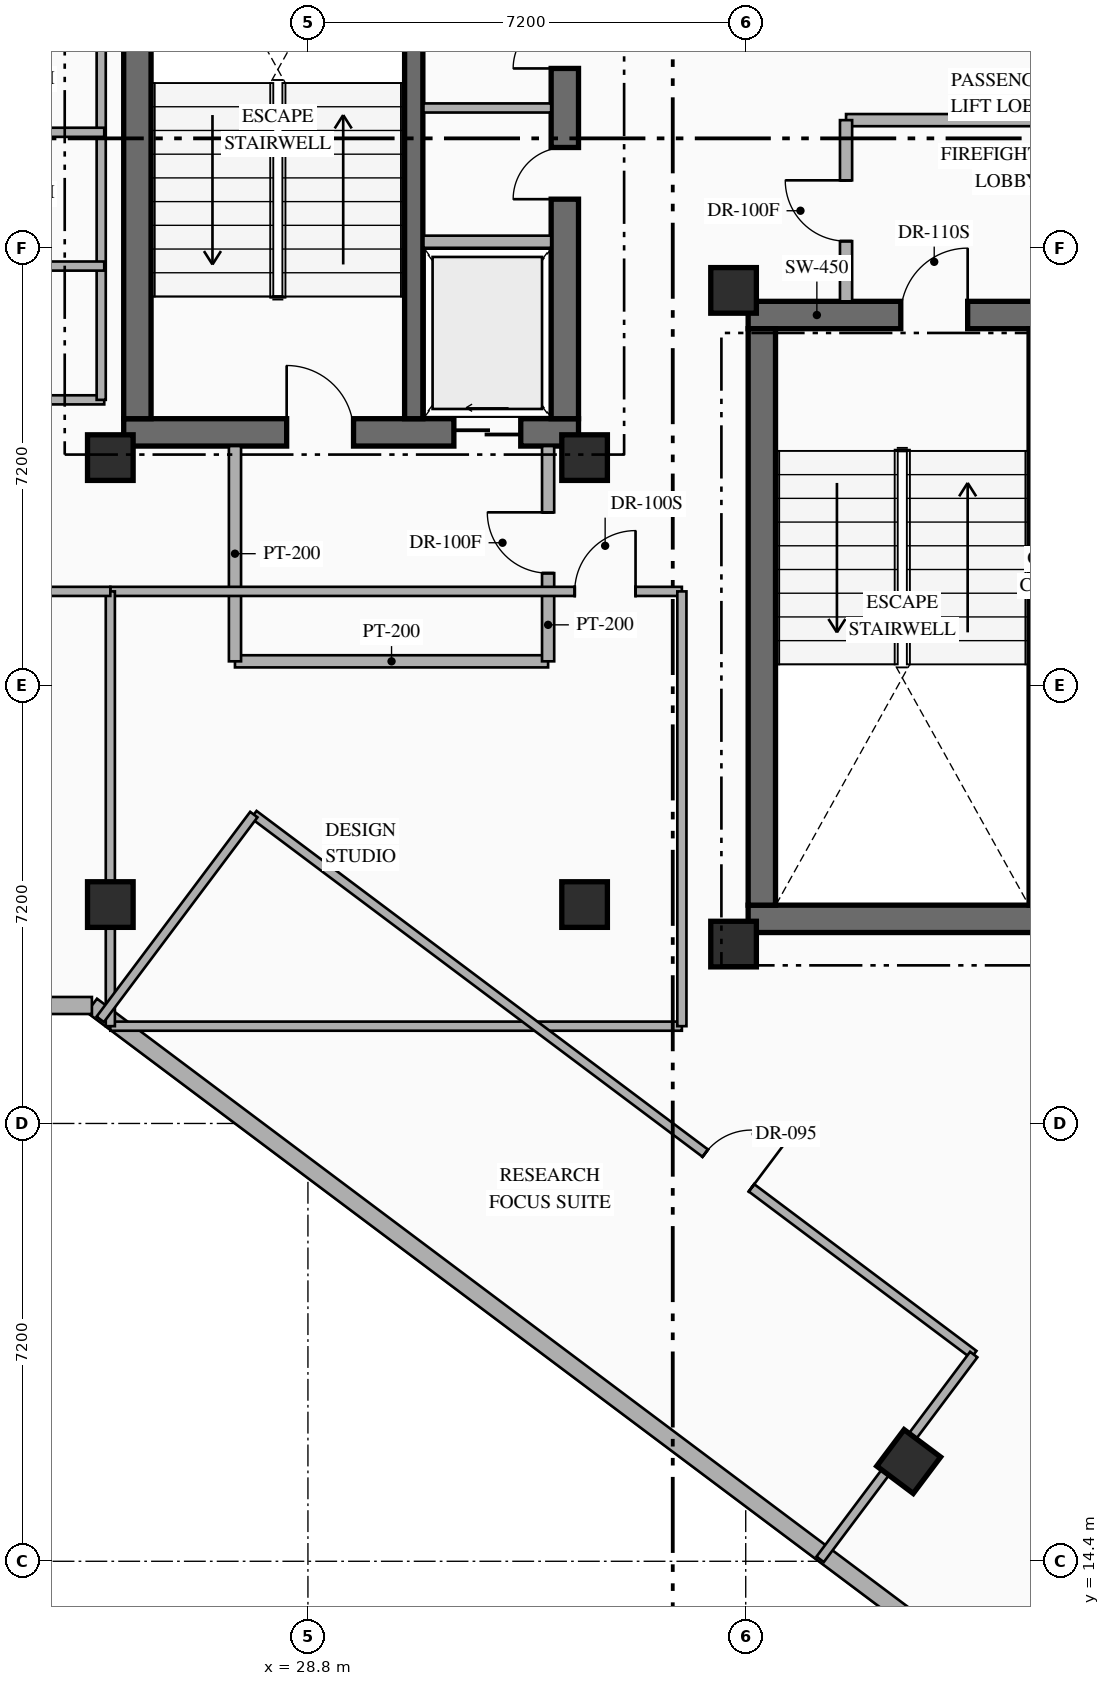
"""IFC4 building model, lengths in metres.
Left out: names, types, materials, properties, quantities, classifications, styles, units other than length and angle.
Written with IfcOpenShell. Run it as: python <this file> out.ifc"""

import sys

from ifc_helpers import new_model, si_unit, direction, frame, frame_2d, origin, origin_2d, place, context, subcontext, project, spatial, rectangle, hollow_rectangle, extrude, element, fill, save


model = new_model("IFC4")
c1 = context("Model", 3, precision=1e-05, world=origin(), true_north=direction((0.0, 1.0)))
c2 = subcontext(c1, "Body", "Model", "MODEL_VIEW")
j1 = project(units=[si_unit("LENGTHUNIT", "METRE"), si_unit("PLANEANGLEUNIT", "RADIAN")], contexts=[c1])
p1 = place(None, origin())
s1 = spatial("IfcSite", under=j1, at=p1, CompositionType="ELEMENT")
p2 = place(p1, origin())
s2 = spatial("IfcBuilding", under=s1, at=p2, CompositionType="ELEMENT")
p3 = place(p2, frame((0.0, 0.0, 205.95)))
s3 = spatial("IfcBuildingStorey", under=s2, at=p3, CompositionType="ELEMENT", Elevation=205.95)
p4 = place(p3, frame((25.77, 32.965, 0.0), z_axis=(0.0, 0.0, 1.0), x_axis=(1.0, 0.0, 0.0)))
e1 = element("IfcWall", 1, at=p4, inside=s3, PredefinedType="SHEAR", context=c2, shape_type="SweptSolid", body=[
    extrude(rectangle(XDim=7.48, YDim=0.45, at=frame_2d((3.74, 0.0))), origin(), (0.0, 0.0, 1.0), 3.6),
])
p5 = place(p4, frame((2.68, 0.0, 0.0)))
e2 = element("IfcOpeningElement", 2, at=p5, cuts=e1, PredefinedType="OPENING", context=c2, shape_type="SweptSolid", body=[
    extrude(rectangle(XDim=1.1, YDim=2.2, at=frame_2d((0.55, 1.1))), frame((0.0, 0.235, 0.0), z_axis=(0.0, -1.0, 0.0), x_axis=(1.0, 0.0, 0.0)), (0.0, 0.0, 1.0), 0.47),
])
p6 = place(p4, frame((5.43, 0.0, 0.0)))
e3 = element("IfcOpeningElement", 3, at=p6, cuts=e1, PredefinedType="OPENING", context=c2, shape_type="SweptSolid", body=[
    extrude(rectangle(XDim=1.1, YDim=2.15, at=frame_2d((0.55, 1.075))), frame((0.0, 0.235, 0.0), z_axis=(0.0, -1.0, 0.0), x_axis=(1.0, 0.0, 0.0)), (0.0, 0.0, 1.0), 0.47),
])
p7 = place(p3, frame((25.995, 33.19, 0.0), z_axis=(0.0, 0.0, 1.0), x_axis=(0.0, 1.0, 0.0)))
e4 = element("IfcWall", 4, at=p7, inside=s3, PredefinedType="SHEAR", context=c2, shape_type="SweptSolid", body=[
    extrude(rectangle(XDim=9.48, YDim=0.45, at=frame_2d((4.74, 0.0))), origin(), (0.0, 0.0, 1.0), 3.6),
])
p8 = place(p3, frame((33.025, 33.19, 0.0), z_axis=(0.0, 0.0, 1.0), x_axis=(0.0, 1.0, 0.0)))
e5 = element("IfcWall", 5, at=p8, inside=s3, PredefinedType="SHEAR", context=c2, shape_type="SweptSolid", body=[
    extrude(rectangle(XDim=9.48, YDim=0.45, at=frame_2d((4.74, 0.0))), origin(), (0.0, 0.0, 1.0), 3.6),
])
p9 = place(p8, frame((3.61, 0.0, 0.0)))
e6 = element("IfcOpeningElement", 6, at=p9, cuts=e5, PredefinedType="OPENING", context=c2, shape_type="SweptSolid", body=[
    extrude(rectangle(XDim=0.85, YDim=2.08, at=frame_2d((0.425, 1.04))), frame((0.0, 0.235, 0.0), z_axis=(0.0, -1.0, 0.0), x_axis=(1.0, 0.0, 0.0)), (0.0, 0.0, 1.0), 0.47),
])
p10 = place(p8, frame((5.76, 0.0, 0.0)))
e7 = element("IfcOpeningElement", 7, at=p10, cuts=e5, PredefinedType="OPENING", context=c2, shape_type="SweptSolid", body=[
    extrude(rectangle(XDim=0.85, YDim=2.08, at=frame_2d((0.425, 1.04))), frame((0.0, 0.235, 0.0), z_axis=(0.0, -1.0, 0.0), x_axis=(1.0, 0.0, 0.0)), (0.0, 0.0, 1.0), 0.47),
])
p11 = place(p8, frame((7.76, 0.0, 0.0)))
e8 = element("IfcOpeningElement", 8, at=p11, cuts=e5, PredefinedType="OPENING", context=c2, shape_type="SweptSolid", body=[
    extrude(rectangle(XDim=0.85, YDim=2.08, at=frame_2d((0.425, 1.04))), frame((0.0, 0.235, 0.0), z_axis=(0.0, -1.0, 0.0), x_axis=(1.0, 0.0, 0.0)), (0.0, 0.0, 1.0), 0.47),
])
p12 = place(p3, frame((30.54, 33.19, 0.0), z_axis=(0.0, 0.0, 1.0), x_axis=(0.0, 1.0, 0.0)))
e9 = element("IfcWall", 9, at=p12, inside=s3, PredefinedType="SHEAR", context=c2, shape_type="SweptSolid", body=[
    extrude(rectangle(XDim=9.48, YDim=0.3, at=frame_2d((4.74, 0.0))), origin(), (0.0, 0.0, 1.0), 3.6),
])
p13 = place(p3, frame((36.04, 24.965, 0.0), z_axis=(0.0, 0.0, 1.0), x_axis=(1.0, 0.0, 0.0)))
e10 = element("IfcWall", 10, at=p13, inside=s3, PredefinedType="SHEAR", context=c2, shape_type="SweptSolid", body=[
    extrude(rectangle(XDim=7.46, YDim=0.45, at=frame_2d((3.73, 0.0))), origin(), (0.0, 0.0, 1.0), 3.6),
])
p14 = place(p3, frame((36.04, 34.895, 0.0), z_axis=(0.0, 0.0, 1.0), x_axis=(1.0, 0.0, 0.0)))
e11 = element("IfcWall", 11, at=p14, inside=s3, PredefinedType="SHEAR", context=c2, shape_type="SweptSolid", body=[
    extrude(rectangle(XDim=7.46, YDim=0.45, at=frame_2d((3.73, 0.0))), origin(), (0.0, 0.0, 1.0), 3.6),
])
p15 = place(p14, frame((2.51, 0.0, 0.0)))
e12 = element("IfcOpeningElement", 12, at=p15, cuts=e11, PredefinedType="OPENING", context=c2, shape_type="SweptSolid", body=[
    extrude(rectangle(XDim=1.1, YDim=2.2, at=frame_2d((0.55, 1.1))), frame((0.0, 0.235, 0.0), z_axis=(0.0, -1.0, 0.0), x_axis=(1.0, 0.0, 0.0)), (0.0, 0.0, 1.0), 0.47),
])
p16 = place(p14, frame((5.41, 0.0, 0.0)))
e13 = element("IfcOpeningElement", 13, at=p16, cuts=e11, PredefinedType="OPENING", context=c2, shape_type="SweptSolid", body=[
    extrude(rectangle(XDim=1.12, YDim=2.15, at=frame_2d((0.56, 1.075))), frame((0.0, 0.235, 0.0), z_axis=(0.0, -1.0, 0.0), x_axis=(1.0, 0.0, 0.0)), (0.0, 0.0, 1.0), 0.47),
])
p17 = place(p3, frame((36.265, 25.19, 0.0), z_axis=(0.0, 0.0, 1.0), x_axis=(0.0, 1.0, 0.0)))
e14 = element("IfcWall", 14, at=p17, inside=s3, PredefinedType="SHEAR", context=c2, shape_type="SweptSolid", body=[
    extrude(rectangle(XDim=9.48, YDim=0.45, at=frame_2d((4.74, 0.0))), origin(), (0.0, 0.0, 1.0), 3.6),
])
p18 = place(p3, frame((40.81, 25.19, 0.0), z_axis=(0.0, 0.0, 1.0), x_axis=(0.0, 1.0, 0.0)))
e15 = element("IfcWall", 15, at=p18, inside=s3, PredefinedType="SHEAR", context=c2, shape_type="SweptSolid", body=[
    extrude(rectangle(XDim=9.48, YDim=0.3, at=frame_2d((4.74, 0.0))), origin(), (0.0, 0.0, 1.0), 3.6),
])
for number, where, z_axis, x_axis in (
    (16, (25.55, 32.55, 0.0), (0.0, 0.0, 1.0), (1.0, 0.0, 0.0)),
    (17, (33.35, 32.55, 0.0), (0.0, 0.0, 1.0), (1.0, 0.0, 0.0)),
    (18, (35.8, 24.55, 0.0), (0.0, 0.0, 1.0), (1.0, 0.0, 0.0)),
    (19, (35.8, 35.3, 0.0), (0.0, 0.0, 1.0), (1.0, 0.0, 0.0)),
    (20, (25.55, 25.2, 0.0), (0.0, 0.0, 1.0), (1.0, 0.0, 0.0)),
    (21, (33.35, 25.2, 0.0), (0.0, 0.0, 1.0), (1.0, 0.0, 0.0)),
    (22, (38.68, 16.04, 0.0), (0.0, 0.0, 1.0), (0.8, -0.6, 0.0)),
):
    element("IfcColumn", number, at=place(p3, frame(where, z_axis=z_axis, x_axis=x_axis)), inside=s3, PredefinedType="COLUMN", context=c2, shape_type="SweptSolid", body=[
        extrude(hollow_rectangle(XDim=0.75, YDim=0.75, WallThickness=0.028, at=origin_2d()), origin(), (0.0, 0.0, 1.0), 3.6),
    ])
p19 = place(p3, frame((44.918, 8.787, 0.0), z_axis=(0.0, 0.0, 1.0), x_axis=(-0.800004765927, 0.599993645378, 0.0)))
e23 = element("IfcWall", 23, at=p19, inside=s3, PredefinedType="STANDARD", context=c2, shape_type="SweptSolid", body=[
    extrude(rectangle(XDim=24.588, YDim=0.28, at=frame_2d((12.294, 0.0))), origin(), (0.0, 0.0, 1.0), 3.35),
])
p20 = place(p3, frame((25.247, 23.54, 0.0), z_axis=(0.0, 0.0, 1.0), x_axis=(-1.0, 0.0, 0.0)))
e24 = element("IfcWall", 24, at=p20, inside=s3, PredefinedType="STANDARD", context=c2, shape_type="SweptSolid", body=[
    extrude(rectangle(XDim=4.789, YDim=0.28, at=frame_2d((2.395, 0.0))), origin(), (0.0, 0.0, 1.0), 3.35),
])
p21 = place(p3, frame((30.7, 36.1, 0.0), z_axis=(0.0, 0.0, 1.0), x_axis=(1.0, 0.0, 0.0)))
e25 = element("IfcWall", 25, at=p21, inside=s3, PredefinedType="STANDARD", context=c2, shape_type="SweptSolid", body=[
    extrude(rectangle(XDim=2.1, YDim=0.2, at=frame_2d((1.05, 0.0))), origin(), (0.0, 0.0, 1.0), 3.35),
])
p22 = place(p3, frame((30.7, 38.3, 0.0), z_axis=(0.0, 0.0, 1.0), x_axis=(1.0, 0.0, 0.0)))
e26 = element("IfcWall", 26, at=p22, inside=s3, PredefinedType="PARTITIONING", context=c2, shape_type="SweptSolid", body=[
    extrude(rectangle(XDim=2.1, YDim=0.15, at=frame_2d((1.05, 0.0))), origin(), (0.0, 0.0, 1.0), 3.35),
])
p23 = place(p3, frame((27.6, 29.2, 0.0), z_axis=(0.0, 0.0, 1.0), x_axis=(1.0, 0.0, 0.0)))
e27 = element("IfcWall", 27, at=p23, inside=s3, PredefinedType="STANDARD", context=c2, shape_type="SweptSolid", body=[
    extrude(rectangle(XDim=5.15, YDim=0.2, at=frame_2d((2.575, 0.0))), origin(), (0.0, 0.0, 1.0), 3.35),
])
p24 = place(p3, frame((27.6, 29.2, 0.0), z_axis=(0.0, 0.0, 1.0), x_axis=(0.0, 1.0, 0.0)))
e28 = element("IfcWall", 28, at=p24, inside=s3, PredefinedType="STANDARD", context=c2, shape_type="SweptSolid", body=[
    extrude(rectangle(XDim=3.54, YDim=0.2, at=frame_2d((1.77, 0.0))), origin(), (0.0, 0.0, 1.0), 3.35),
])
p25 = place(p3, frame((32.75, 29.2, 0.0), z_axis=(0.0, 0.0, 1.0), x_axis=(0.0, 1.0, 0.0)))
e29 = element("IfcWall", 29, at=p25, inside=s3, PredefinedType="STANDARD", context=c2, shape_type="SweptSolid", body=[
    extrude(rectangle(XDim=3.54, YDim=0.2, at=frame_2d((1.77, 0.0))), origin(), (0.0, 0.0, 1.0), 3.35),
])
p26 = place(p25, frame((1.45, 0.0, 0.0)))
e30 = element("IfcOpeningElement", 30, at=p26, cuts=e29, PredefinedType="OPENING", context=c2, shape_type="SweptSolid", body=[
    extrude(rectangle(XDim=1.0, YDim=2.2, at=frame_2d((0.5, 1.1))), frame((0.0, 0.11, 0.0), z_axis=(0.0, -1.0, 0.0), x_axis=(1.0, 0.0, 0.0)), (0.0, 0.0, 1.0), 0.22),
])
p27 = place(p3, frame((37.65, 38.1, 0.0), z_axis=(0.0, 0.0, 1.0), x_axis=(1.0, 0.0, 0.0)))
e31 = element("IfcWall", 31, at=p27, inside=s3, PredefinedType="STANDARD", context=c2, shape_type="SweptSolid", body=[
    extrude(rectangle(XDim=5.3, YDim=0.2, at=frame_2d((2.65, 0.0))), origin(), (0.0, 0.0, 1.0), 3.35),
])
p28 = place(p3, frame((37.65, 35.12, 0.0), z_axis=(0.0, 0.0, 1.0), x_axis=(0.0, 1.0, 0.0)))
e32 = element("IfcWall", 32, at=p28, inside=s3, PredefinedType="STANDARD", context=c2, shape_type="SweptSolid", body=[
    extrude(rectangle(XDim=2.98, YDim=0.2, at=frame_2d((1.49, 0.0))), origin(), (0.0, 0.0, 1.0), 3.35),
])
p29 = place(p28, frame((0.99, 0.0, 0.0)))
e33 = element("IfcOpeningElement", 33, at=p29, cuts=e32, PredefinedType="OPENING", context=c2, shape_type="SweptSolid", body=[
    extrude(rectangle(XDim=1.0, YDim=2.2, at=frame_2d((0.5, 1.1))), frame((0.0, 0.11, 0.0), z_axis=(0.0, -1.0, 0.0), x_axis=(1.0, 0.0, 0.0)), (0.0, 0.0, 1.0), 0.22),
])
p30 = place(p3, frame((22.15, 33.5, 0.0), z_axis=(0.0, 0.0, 1.0), x_axis=(1.0, 0.0, 0.0)))
e34 = element("IfcWall", 34, at=p30, inside=s3, PredefinedType="PARTITIONING", context=c2, shape_type="SweptSolid", body=[
    extrude(rectangle(XDim=3.3, YDim=0.15, at=frame_2d((1.65, 0.0))), origin(), (0.0, 0.0, 1.0), 3.35),
])
p31 = place(p3, frame((25.4, 33.5, 0.0), z_axis=(0.0, 0.0, 1.0), x_axis=(0.0, 1.0, 0.0)))
e35 = element("IfcWall", 35, at=p31, inside=s3, PredefinedType="PARTITIONING", context=c2, shape_type="SweptSolid", body=[
    extrude(rectangle(XDim=6.6, YDim=0.15, at=frame_2d((3.3, 0.0))), origin(), (0.0, 0.0, 1.0), 3.35),
])
for number, where, z_axis, x_axis in (
    (36, (22.15, 35.7, 0.0), (0.0, 0.0, 1.0), (1.0, 0.0, 0.0)),
    (37, (22.15, 37.9, 0.0), (0.0, 0.0, 1.0), (1.0, 0.0, 0.0)),
):
    element("IfcWall", number, at=place(p3, frame(where, z_axis=z_axis, x_axis=x_axis)), inside=s3, PredefinedType="PARTITIONING", context=c2, shape_type="SweptSolid", body=[
        extrude(rectangle(XDim=3.3, YDim=0.15, at=frame_2d((1.65, 0.0))), origin(), (0.0, 0.0, 1.0), 3.35),
    ])
p32 = place(p3, frame((25.55, 23.2, 0.0), z_axis=(0.0, 0.0, 1.0), x_axis=(1.0, 0.0, 0.0)))
e38 = element("IfcWall", 38, at=p32, inside=s3, PredefinedType="PARTITIONING", context=c2, shape_type="SweptSolid", body=[
    extrude(rectangle(XDim=9.4, YDim=0.15, at=frame_2d((4.7, 0.0))), origin(), (0.0, 0.0, 1.0), 3.35),
])
p33 = place(p3, frame((25.55, 30.35, 0.0), z_axis=(0.0, 0.0, 1.0), x_axis=(1.0, 0.0, 0.0)))
e39 = element("IfcWall", 39, at=p33, inside=s3, PredefinedType="PARTITIONING", context=c2, shape_type="SweptSolid", body=[
    extrude(rectangle(XDim=9.4, YDim=0.15, at=frame_2d((4.7, 0.0))), origin(), (0.0, 0.0, 1.0), 3.35),
])
p34 = place(p33, frame((7.638, 0.0, 0.0)))
e40 = element("IfcOpeningElement", 40, at=p34, cuts=e39, PredefinedType="OPENING", context=c2, shape_type="SweptSolid", body=[
    extrude(rectangle(XDim=1.0, YDim=2.15, at=frame_2d((0.5, 1.075))), frame((0.0, 0.085, 0.0), z_axis=(0.0, -1.0, 0.0), x_axis=(1.0, 0.0, 0.0)), (0.0, 0.0, 1.0), 0.17),
])
p35 = place(p3, frame((25.55, 23.2, 0.0), z_axis=(0.0, 0.0, 1.0), x_axis=(0.0, 1.0, 0.0)))
e41 = element("IfcWall", 41, at=p35, inside=s3, PredefinedType="PARTITIONING", context=c2, shape_type="SweptSolid", body=[
    extrude(rectangle(XDim=7.15, YDim=0.15, at=frame_2d((3.575, 0.0))), origin(), (0.0, 0.0, 1.0), 2.757),
])
p36 = place(p3, frame((34.95, 23.2, 0.0), z_axis=(0.0, 0.0, 1.0), x_axis=(0.0, 1.0, 0.0)))
e42 = element("IfcWall", 42, at=p36, inside=s3, PredefinedType="PARTITIONING", context=c2, shape_type="SweptSolid", body=[
    extrude(rectangle(XDim=7.15, YDim=0.15, at=frame_2d((3.575, 0.0))), origin(), (0.0, 0.0, 1.0), 3.35),
])
p37 = place(p3, frame((22.25, 30.35, 0.0), z_axis=(0.0, 0.0, 1.0), x_axis=(1.0, 0.0, 0.0)))
e43 = element("IfcWall", 43, at=p37, inside=s3, PredefinedType="PARTITIONING", context=c2, shape_type="SweptSolid", body=[
    extrude(rectangle(XDim=3.3, YDim=0.15, at=frame_2d((1.65, 0.0))), origin(), (0.0, 0.0, 1.0), 3.35),
])
p38 = place(p37, frame((1.175, 0.0, 0.0)))
e44 = element("IfcOpeningElement", 44, at=p38, cuts=e43, PredefinedType="OPENING", context=c2, shape_type="SweptSolid", body=[
    extrude(rectangle(XDim=0.95, YDim=2.15, at=frame_2d((0.475, 1.075))), frame((0.0, 0.085, 0.0), z_axis=(0.0, -1.0, 0.0), x_axis=(1.0, 0.0, 0.0)), (0.0, 0.0, 1.0), 0.17),
])
p39 = place(p3, frame((27.91, 26.68, 0.0), z_axis=(0.0, 0.0, 1.0), x_axis=(0.800005938517, -0.599992081896, 0.0)))
e45 = element("IfcWall", 45, at=p39, inside=s3, PredefinedType="PARTITIONING", context=c2, shape_type="SweptSolid", body=[
    extrude(rectangle(XDim=14.8, YDim=0.15, at=frame_2d((7.4, 0.0))), origin(), (0.0, 0.0, 1.0), 3.35),
])
p40 = place(p39, frame((9.281, 0.0, 0.0)))
e46 = element("IfcOpeningElement", 46, at=p40, cuts=e45, PredefinedType="OPENING", context=c2, shape_type="SweptSolid", body=[
    extrude(rectangle(XDim=0.95, YDim=2.15, at=frame_2d((0.475, 1.075))), frame((0.0, 0.085, 0.0), z_axis=(0.0, -1.0, 0.0), x_axis=(1.0, 0.0, 0.0)), (0.0, 0.0, 1.0), 0.17),
])
p41 = place(p3, frame((25.384, 23.312, 0.0), z_axis=(0.0, 0.0, 1.0), x_axis=(0.599990721155, 0.80000695905, 0.0)))
e47 = element("IfcWall", 47, at=p41, inside=s3, PredefinedType="PARTITIONING", context=c2, shape_type="SweptSolid", body=[
    extrude(rectangle(XDim=4.21, YDim=0.15, at=frame_2d((2.105, 0.0))), origin(), (0.0, 0.0, 1.0), 3.35),
])
p42 = place(p3, frame((37.224, 14.432, 0.0), z_axis=(0.0, 0.0, 1.0), x_axis=(0.599962885857, 0.800027834262, 0.0)))
e48 = element("IfcWall", 48, at=p42, inside=s3, PredefinedType="PARTITIONING", context=c2, shape_type="SweptSolid", body=[
    extrude(rectangle(XDim=4.21, YDim=0.15, at=frame_2d((2.105, 0.0))), origin(), (0.0, 0.0, 1.0), 2.757),
])
p43 = place(p5, origin())
e49 = element("IfcDoor", 49, at=p43, inside=s3, OperationType="SINGLE_SWING_LEFT", PredefinedType="DOOR", context=c2, shape_type="SweptSolid", body=[
    extrude(rectangle(XDim=1.1, YDim=2.2, at=frame_2d((0.55, 1.1))), frame((0.0, 0.025, 0.0), z_axis=(0.0, -1.0, 0.0), x_axis=(1.0, 0.0, 0.0)), (0.0, 0.0, 1.0), 0.05),
])
fill(e2, e49)
p44 = place(p6, origin())
e50 = element("IfcDoor", 50, at=p44, inside=s3, OperationType="SLIDING_TO_LEFT", PredefinedType="USERDEFINED", context=c2, shape_type="SweptSolid", body=[
    extrude(rectangle(XDim=1.1, YDim=2.15, at=frame_2d((0.55, 1.075))), frame((0.0, 0.025, 0.0), z_axis=(0.0, -1.0, 0.0), x_axis=(1.0, 0.0, 0.0)), (0.0, 0.0, 1.0), 0.05),
])
fill(e3, e50)
p45 = place(p15, origin())
e51 = element("IfcDoor", 51, at=p45, inside=s3, OperationType="SINGLE_SWING_RIGHT", PredefinedType="DOOR", context=c2, shape_type="SweptSolid", body=[
    extrude(rectangle(XDim=1.1, YDim=2.2, at=frame_2d((0.55, 1.1))), frame((0.0, 0.025, 0.0), z_axis=(0.0, -1.0, 0.0), x_axis=(1.0, 0.0, 0.0)), (0.0, 0.0, 1.0), 0.05),
])
fill(e12, e51)
p46 = place(p9, origin())
e52 = element("IfcDoor", 52, at=p46, inside=s3, OperationType="SINGLE_SWING_LEFT", PredefinedType="DOOR", context=c2, shape_type="SweptSolid", body=[
    extrude(rectangle(XDim=0.85, YDim=2.08, at=frame_2d((0.425, 1.04))), frame((0.0, 0.025, 0.0), z_axis=(0.0, -1.0, 0.0), x_axis=(1.0, 0.0, 0.0)), (0.0, 0.0, 1.0), 0.05),
])
fill(e6, e52)
p47 = place(p10, origin())
e53 = element("IfcDoor", 53, at=p47, inside=s3, OperationType="SINGLE_SWING_LEFT", PredefinedType="DOOR", context=c2, shape_type="SweptSolid", body=[
    extrude(rectangle(XDim=0.85, YDim=2.08, at=frame_2d((0.425, 1.04))), frame((0.0, 0.025, 0.0), z_axis=(0.0, -1.0, 0.0), x_axis=(1.0, 0.0, 0.0)), (0.0, 0.0, 1.0), 0.05),
])
fill(e7, e53)
p48 = place(p26, origin())
e54 = element("IfcDoor", 54, at=p48, inside=s3, OperationType="SINGLE_SWING_RIGHT", PredefinedType="DOOR", context=c2, shape_type="SweptSolid", body=[
    extrude(rectangle(XDim=1.0, YDim=2.2, at=frame_2d((0.5, 1.1))), frame((0.0, 0.025, 0.0), z_axis=(0.0, -1.0, 0.0), x_axis=(1.0, 0.0, 0.0)), (0.0, 0.0, 1.0), 0.05),
])
fill(e30, e54)
p49 = place(p29, origin())
e55 = element("IfcDoor", 55, at=p49, inside=s3, OperationType="SINGLE_SWING_RIGHT", PredefinedType="DOOR", context=c2, shape_type="SweptSolid", body=[
    extrude(rectangle(XDim=1.0, YDim=2.2, at=frame_2d((0.5, 1.1))), frame((0.0, 0.025, 0.0), z_axis=(0.0, -1.0, 0.0), x_axis=(1.0, 0.0, 0.0)), (0.0, 0.0, 1.0), 0.05),
])
fill(e33, e55)
p50 = place(p34, origin())
e56 = element("IfcDoor", 56, at=p50, inside=s3, OperationType="SINGLE_SWING_RIGHT", PredefinedType="DOOR", context=c2, shape_type="SweptSolid", body=[
    extrude(rectangle(XDim=1.0, YDim=2.15, at=frame_2d((0.5, 1.075))), frame((0.0, 0.025, 0.0), z_axis=(0.0, -1.0, 0.0), x_axis=(1.0, 0.0, 0.0)), (0.0, 0.0, 1.0), 0.05),
])
fill(e40, e56)
p51 = place(p40, origin())
e57 = element("IfcDoor", 57, at=p51, inside=s3, OperationType="SINGLE_SWING_RIGHT", PredefinedType="DOOR", context=c2, shape_type="SweptSolid", body=[
    extrude(rectangle(XDim=0.95, YDim=2.15, at=frame_2d((0.475, 1.075))), frame((0.0, 0.025, 0.0), z_axis=(0.0, -1.0, 0.0), x_axis=(1.0, 0.0, 0.0)), (0.0, 0.0, 1.0), 0.05),
])
fill(e46, e57)
save(model, sys.argv[1])
